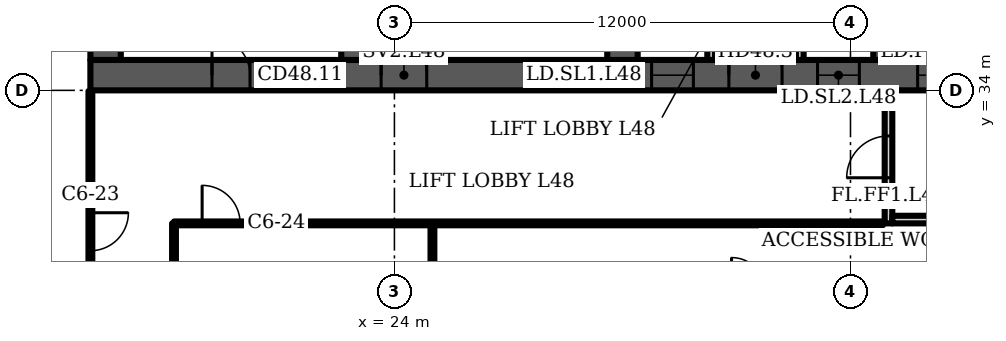
"""IFC4 building model, lengths in metres.
Left out: names, types, materials, properties, quantities, classifications, styles, units other than length and angle.
Written with IfcOpenShell. Run it as: python <this file> out.ifc"""

import sys

from ifc_helpers import new_model, si_unit, direction, frame, frame_2d, origin, place, context, subcontext, project, spatial, polyline, rectangle, outline, extrude, element, fill, save


model = new_model("IFC4")
c1 = context("Model", 3, precision=1e-05, world=origin(), true_north=direction((0.0, 1.0)))
c2 = subcontext(c1, "Body", "Model", "MODEL_VIEW")
j1 = project(units=[si_unit("LENGTHUNIT", "METRE"), si_unit("PLANEANGLEUNIT", "RADIAN")], contexts=[c1])
p1 = place(None, origin())
s1 = spatial("IfcSite", under=j1, at=p1, CompositionType="ELEMENT")
p2 = place(p1, origin())
s2 = spatial("IfcBuilding", under=s1, at=p2, CompositionType="ELEMENT")
p3 = place(p2, frame((0.0, 0.0, 195.1)))
s3 = spatial("IfcBuildingStorey", under=s2, at=p3, CompositionType="ELEMENT", Elevation=195.1)
p4 = place(p3, frame((16.0, 34.4, 0.0), z_axis=(0.0, 0.0, 1.0), x_axis=(1.0, 0.0, 0.0)))
e1 = element("IfcWall", 1, at=p4, inside=s3, PredefinedType="SHEAR", context=c2, shape_type="SweptSolid", body=[
    extrude(rectangle(XDim=42.0, YDim=0.8, at=frame_2d((21.0, 0.0))), origin(), (0.0, 0.0, 1.0), 3.6),
])
p5 = place(p4, frame((3.2, 0.0, 0.0)))
e2 = element("IfcOpeningElement", 2, at=p5, cuts=e1, PredefinedType="OPENING", context=c2, shape_type="SweptSolid", body=[
    extrude(rectangle(XDim=1.0, YDim=2.1, at=frame_2d((0.5, 1.05))), frame((0.0, 0.41, 0.0), z_axis=(0.0, -1.0, 0.0), x_axis=(1.0, 0.0, 0.0)), (0.0, 0.0, 1.0), 0.82),
])
p6 = place(p4, frame((7.65, 0.0, 0.0)))
e3 = element("IfcOpeningElement", 3, at=p6, cuts=e1, PredefinedType="OPENING", context=c2, shape_type="SweptSolid", body=[
    extrude(rectangle(XDim=1.2, YDim=2.1, at=frame_2d((0.6, 1.05))), frame((0.0, 0.41, 0.0), z_axis=(0.0, -1.0, 0.0), x_axis=(1.0, 0.0, 0.0)), (0.0, 0.0, 1.0), 0.82),
])
p7 = place(p4, frame((14.767, 0.0, 0.0)))
e4 = element("IfcOpeningElement", 4, at=p7, cuts=e1, PredefinedType="OPENING", context=c2, shape_type="SweptSolid", body=[
    extrude(rectangle(XDim=1.1, YDim=2.1, at=frame_2d((0.55, 1.05))), frame((0.0, 0.41, 0.0), z_axis=(0.0, -1.0, 0.0), x_axis=(1.0, 0.0, 0.0)), (0.0, 0.0, 1.0), 0.82),
])
p8 = place(p4, frame((19.133, 0.0, 0.0)))
e5 = element("IfcOpeningElement", 5, at=p8, cuts=e1, PredefinedType="OPENING", context=c2, shape_type="SweptSolid", body=[
    extrude(rectangle(XDim=1.1, YDim=2.1, at=frame_2d((0.55, 1.05))), frame((0.0, 0.41, 0.0), z_axis=(0.0, -1.0, 0.0), x_axis=(1.0, 0.0, 0.0)), (0.0, 0.0, 1.0), 0.82),
])
p9 = place(p4, frame((16.8, 0.0, 0.0)))
e6 = element("IfcOpeningElement", 6, at=p9, cuts=e1, PredefinedType="OPENING", context=c2, shape_type="SweptSolid", body=[
    extrude(rectangle(XDim=1.4, YDim=2.1, at=frame_2d((0.7, 1.05))), frame((0.0, 0.41, 0.0), z_axis=(0.0, -1.0, 0.0), x_axis=(1.0, 0.0, 0.0)), (0.0, 0.0, 1.0), 0.82),
])
p10 = place(p4, frame((21.767, 0.0, 0.0)))
e7 = element("IfcOpeningElement", 7, at=p10, cuts=e1, PredefinedType="OPENING", context=c2, shape_type="SweptSolid", body=[
    extrude(rectangle(XDim=1.1, YDim=2.1, at=frame_2d((0.55, 1.05))), frame((0.0, 0.41, 0.0), z_axis=(0.0, -1.0, 0.0), x_axis=(1.0, 0.0, 0.0)), (0.0, 0.0, 1.0), 0.82),
])
p11 = place(p4, frame((23.95, 0.0, 0.0)))
e8 = element("IfcOpeningElement", 8, at=p11, cuts=e1, PredefinedType="OPENING", context=c2, shape_type="SweptSolid", body=[
    extrude(rectangle(XDim=1.1, YDim=2.1, at=frame_2d((0.55, 1.05))), frame((0.0, 0.41, 0.0), z_axis=(0.0, -1.0, 0.0), x_axis=(1.0, 0.0, 0.0)), (0.0, 0.0, 1.0), 0.82),
])
p12 = place(p4, frame((26.133, 0.0, 0.0)))
e9 = element("IfcOpeningElement", 9, at=p12, cuts=e1, PredefinedType="OPENING", context=c2, shape_type="SweptSolid", body=[
    extrude(rectangle(XDim=1.1, YDim=2.1, at=frame_2d((0.55, 1.05))), frame((0.0, 0.41, 0.0), z_axis=(0.0, -1.0, 0.0), x_axis=(1.0, 0.0, 0.0)), (0.0, 0.0, 1.0), 0.82),
])
p13 = place(p4, frame((33.15, 0.0, 0.0)))
e10 = element("IfcOpeningElement", 10, at=p13, cuts=e1, PredefinedType="OPENING", context=c2, shape_type="SweptSolid", body=[
    extrude(rectangle(XDim=1.2, YDim=2.1, at=frame_2d((0.6, 1.05))), frame((0.0, 0.41, 0.0), z_axis=(0.0, -1.0, 0.0), x_axis=(1.0, 0.0, 0.0)), (0.0, 0.0, 1.0), 0.82),
])
p14 = place(p4, frame((35.817, 0.0, 0.0)))
e11 = element("IfcOpeningElement", 11, at=p14, cuts=e1, PredefinedType="OPENING", context=c2, shape_type="SweptSolid", body=[
    extrude(rectangle(XDim=1.0, YDim=2.1, at=frame_2d((0.5, 1.05))), frame((0.0, 0.41, 0.0), z_axis=(0.0, -1.0, 0.0), x_axis=(1.0, 0.0, 0.0)), (0.0, 0.0, 1.0), 0.82),
])
p15 = place(p4, frame((39.95, 0.0, 0.0)))
e12 = element("IfcOpeningElement", 12, at=p15, cuts=e1, PredefinedType="OPENING", context=c2, shape_type="SweptSolid", body=[
    extrude(rectangle(XDim=1.0, YDim=2.1, at=frame_2d((0.5, 1.05))), frame((0.0, 0.41, 0.0), z_axis=(0.0, -1.0, 0.0), x_axis=(1.0, 0.0, 0.0)), (0.0, 0.0, 1.0), 0.82),
])
p16 = place(p4, frame((37.767, 0.0, 0.0)))
e13 = element("IfcOpeningElement", 13, at=p16, cuts=e1, PredefinedType="OPENING", context=c2, shape_type="SweptSolid", body=[
    extrude(rectangle(XDim=1.4, YDim=2.1, at=frame_2d((0.7, 1.05))), frame((0.0, 0.41, 0.0), z_axis=(0.0, -1.0, 0.0), x_axis=(1.0, 0.0, 0.0)), (0.0, 0.0, 1.0), 0.82),
])
p17 = place(p3, frame((16.4, 34.8, 0.0), z_axis=(0.0, 0.0, 1.0), x_axis=(0.0, 1.0, 0.0)))
e14 = element("IfcWall", 14, at=p17, inside=s3, PredefinedType="SHEAR", context=c2, shape_type="SweptSolid", body=[
    extrude(rectangle(XDim=13.184, YDim=0.8, at=frame_2d((6.592, 0.0))), origin(), (0.0, 0.0, 1.0), 3.6),
])
p18 = place(p3, frame((23.0, 34.8, 0.0), z_axis=(0.0, 0.0, 1.0), x_axis=(0.0, 1.0, 0.0)))
e15 = element("IfcWall", 15, at=p18, inside=s3, PredefinedType="SHEAR", context=c2, shape_type="SweptSolid", body=[
    extrude(rectangle(XDim=13.762, YDim=0.8, at=frame_2d((6.881, 0.0))), origin(), (0.0, 0.0, 1.0), 3.6),
])
p19 = place(p18, frame((2.55, 0.0, 0.0)))
e16 = element("IfcOpeningElement", 16, at=p19, cuts=e15, PredefinedType="OPENING", context=c2, shape_type="SweptSolid", body=[
    extrude(rectangle(XDim=1.1, YDim=2.1, at=frame_2d((0.55, 1.05))), frame((0.0, 0.41, 0.0), z_axis=(0.0, -1.0, 0.0), x_axis=(1.0, 0.0, 0.0)), (0.0, 0.0, 1.0), 0.82),
])
p20 = place(p18, frame((10.0, 0.0, 0.0)))
e17 = element("IfcOpeningElement", 17, at=p20, cuts=e15, PredefinedType="OPENING", context=c2, shape_type="SweptSolid", body=[
    extrude(rectangle(XDim=1.0, YDim=2.1, at=frame_2d((0.5, 1.05))), frame((0.0, 0.41, 0.0), z_axis=(0.0, -1.0, 0.0), x_axis=(1.0, 0.0, 0.0)), (0.0, 0.0, 1.0), 0.82),
])
p21 = place(p3, frame((30.0, 34.8, 0.0), z_axis=(0.0, 0.0, 1.0), x_axis=(0.0, 1.0, 0.0)))
e18 = element("IfcWall", 18, at=p21, inside=s3, PredefinedType="SHEAR", context=c2, shape_type="SweptSolid", body=[
    extrude(rectangle(XDim=14.374, YDim=0.8, at=frame_2d((7.187, 0.0))), origin(), (0.0, 0.0, 1.0), 3.6),
])
p22 = place(p21, frame((3.6, 0.0, 0.0)))
e19 = element("IfcOpeningElement", 19, at=p22, cuts=e18, PredefinedType="OPENING", context=c2, shape_type="SweptSolid", body=[
    extrude(rectangle(XDim=1.1, YDim=2.1, at=frame_2d((0.55, 1.05))), frame((0.0, 0.41, 0.0), z_axis=(0.0, -1.0, 0.0), x_axis=(1.0, 0.0, 0.0)), (0.0, 0.0, 1.0), 0.82),
])
p23 = place(p3, frame((37.0, 34.8, 0.0), z_axis=(0.0, 0.0, 1.0), x_axis=(0.0, 1.0, 0.0)))
e20 = element("IfcWall", 20, at=p23, inside=s3, PredefinedType="SHEAR", context=c2, shape_type="SweptSolid", body=[
    extrude(rectangle(XDim=14.987, YDim=0.8, at=frame_2d((7.493, 0.0))), origin(), (0.0, 0.0, 1.0), 3.6),
])
p24 = place(p23, frame((11.312, 0.0, 0.0)))
e21 = element("IfcOpeningElement", 21, at=p24, cuts=e20, PredefinedType="OPENING", context=c2, shape_type="SweptSolid", body=[
    extrude(rectangle(XDim=1.0, YDim=2.1, at=frame_2d((0.5, 1.05))), frame((0.0, 0.41, 0.0), z_axis=(0.0, -1.0, 0.0), x_axis=(1.0, 0.0, 0.0)), (0.0, 0.0, 1.0), 0.82),
])
p25 = place(p23, frame((3.6, 0.0, 0.0)))
e22 = element("IfcOpeningElement", 22, at=p25, cuts=e20, PredefinedType="OPENING", context=c2, shape_type="SweptSolid", body=[
    extrude(rectangle(XDim=1.1, YDim=2.1, at=frame_2d((0.55, 1.05))), frame((0.0, 0.41, 0.0), z_axis=(0.0, -1.0, 0.0), x_axis=(1.0, 0.0, 0.0)), (0.0, 0.0, 1.0), 0.82),
])
p26 = place(p3, frame((0.0, 0.0, -0.0)))
e23 = element("IfcWall", 23, at=p26, inside=s3, PredefinedType="PARTITIONING", context=c2, shape_type="SweptSolid", body=[
    extrude(outline(polyline([(32.233, 37.65), (30.4, 37.65), (30.4, 37.85), (32.233, 37.85), (32.433, 37.85), (32.433, 34.8), (32.233, 34.8), (32.233, 37.65)])), origin(), (0.0, 0.0, 1.0), 3.2),
])
p27 = place(p3, frame((0.0, 0.0, -0.0)))
e24 = element("IfcWall", 24, at=p27, inside=s3, PredefinedType="PARTITIONING", context=c2, shape_type="SweptSolid", body=[
    extrude(outline(polyline([(34.567, 37.85), (34.767, 37.85), (36.6, 37.85), (36.6, 37.65), (34.767, 37.65), (34.767, 34.8), (34.567, 34.8), (34.567, 37.85)])), origin(), (0.0, 0.0, 1.0), 3.2),
])
p28 = place(p3, frame((0.0, 0.0, -0.0)))
e25 = element("IfcWall", 25, at=p28, inside=s3, PredefinedType="PARTITIONING", context=c2, shape_type="SweptSolid", body=[
    extrude(outline(polyline([(41.567, 37.1), (39.433, 37.1), (39.433, 34.8), (39.233, 34.8), (39.233, 37.65), (37.4, 37.65), (37.4, 37.85), (39.233, 37.85), (39.433, 37.85), (39.433, 37.3), (41.567, 37.3), (41.567, 37.55), (41.767, 37.55), (43.6, 37.55), (43.6, 37.35), (41.767, 37.35), (41.767, 34.8), (41.567, 34.8), (41.567, 37.1)])), origin(), (0.0, 0.0, 1.0), 3.2),
])
p29 = place(p3, frame((37.0, 30.5, 0.0), z_axis=(0.0, 0.0, 1.0), x_axis=(0.0, 1.0, 0.0)))
e26 = element("IfcWall", 26, at=p29, inside=s3, PredefinedType="PARTITIONING", context=c2, shape_type="SweptSolid", body=[
    extrude(rectangle(XDim=3.5, YDim=0.2, at=frame_2d((1.75, 0.0))), origin(), (0.0, 0.0, 1.0), 3.2),
])
p30 = place(p29, frame((1.2, 0.0, 0.0)))
e27 = element("IfcOpeningElement", 27, at=p30, cuts=e26, PredefinedType="OPENING", context=c2, shape_type="SweptSolid", body=[
    extrude(rectangle(XDim=1.1, YDim=2.1, at=frame_2d((0.55, 1.05))), frame((0.0, 0.11, 0.0), z_axis=(0.0, -1.0, 0.0), x_axis=(1.0, 0.0, 0.0)), (0.0, 0.0, 1.0), 0.22),
])
p31 = place(p3, frame((37.1, 30.6, 0.0), z_axis=(0.0, 0.0, 1.0), x_axis=(1.0, 0.0, 0.0)))
e28 = element("IfcWall", 28, at=p31, inside=s3, PredefinedType="PARTITIONING", context=c2, shape_type="SweptSolid", body=[
    extrude(rectangle(XDim=2.8, YDim=0.2, at=frame_2d((1.4, 0.0))), origin(), (0.0, 0.0, 1.0), 3.2),
])
p32 = place(p3, frame((16.0, 26.45, 0.0), z_axis=(0.0, 0.0, 1.0), x_axis=(0.0, 1.0, 0.0)))
e29 = element("IfcWall", 29, at=p32, inside=s3, PredefinedType="PARTITIONING", context=c2, shape_type="SweptSolid", body=[
    extrude(rectangle(XDim=7.53, YDim=0.1, at=frame_2d((3.765, 0.0))), origin(), (0.0, 0.0, 1.0), 3.2),
])
p33 = place(p32, frame((3.33, 0.0, 0.0)))
e30 = element("IfcOpeningElement", 30, at=p33, cuts=e29, PredefinedType="OPENING", context=c2, shape_type="SweptSolid", body=[
    extrude(rectangle(XDim=1.0, YDim=2.1, at=frame_2d((0.5, 1.05))), frame((0.0, 0.06, 0.0), z_axis=(0.0, -1.0, 0.0), x_axis=(1.0, 0.0, 0.0)), (0.0, 0.0, 1.0), 0.12),
])
p34 = place(p3, frame((18.2, 26.06, 0.0), z_axis=(0.0, 0.0, 1.0), x_axis=(0.0, 1.0, 0.0)))
e31 = element("IfcWall", 31, at=p34, inside=s3, PredefinedType="PARTITIONING", context=c2, shape_type="SweptSolid", body=[
    extrude(rectangle(XDim=4.44, YDim=0.1, at=frame_2d((2.22, 0.0))), origin(), (0.0, 0.0, 1.0), 3.2),
])
p35 = place(p3, frame((18.2, 30.5, 0.0), z_axis=(0.0, 0.0, 1.0), x_axis=(1.0, 0.0, 0.0)))
e32 = element("IfcWall", 32, at=p35, inside=s3, PredefinedType="PARTITIONING", context=c2, shape_type="SweptSolid", body=[
    extrude(rectangle(XDim=18.65, YDim=0.1, at=frame_2d((9.325, 0.0))), origin(), (0.0, 0.0, 1.0), 3.2),
])
p36 = place(p35, frame((0.74, 0.0, 0.0)))
e33 = element("IfcOpeningElement", 33, at=p36, cuts=e32, PredefinedType="OPENING", context=c2, shape_type="SweptSolid", body=[
    extrude(rectangle(XDim=1.0, YDim=2.1, at=frame_2d((0.5, 1.05))), frame((0.0, 0.06, 0.0), z_axis=(0.0, -1.0, 0.0), x_axis=(1.0, 0.0, 0.0)), (0.0, 0.0, 1.0), 0.12),
])
p37 = place(p3, frame((25.0, 22.34, 0.0), z_axis=(0.0, 0.0, 1.0), x_axis=(0.0, 1.0, 0.0)))
e34 = element("IfcWall", 34, at=p37, inside=s3, PredefinedType="PARTITIONING", context=c2, shape_type="SweptSolid", body=[
    extrude(rectangle(XDim=8.16, YDim=0.1, at=frame_2d((4.08, 0.0))), origin(), (0.0, 0.0, 1.0), 3.2),
])
p38 = place(p5, origin())
e35 = element("IfcDoor", 35, at=p38, inside=s3, OperationType="SINGLE_SWING_LEFT", PredefinedType="DOOR", context=c2, shape_type="SweptSolid", body=[
    extrude(rectangle(XDim=1.0, YDim=2.1, at=frame_2d((0.5, 1.05))), frame((0.0, 0.4, 0.0), z_axis=(0.0, -1.0, 0.0), x_axis=(1.0, 0.0, 0.0)), (0.0, 0.0, 1.0), 0.8),
])
fill(e2, e35)
p39 = place(p6, origin())
e36 = element("IfcDoor", 36, at=p39, inside=s3, OperationType="SINGLE_SWING_LEFT", PredefinedType="DOOR", context=c2, shape_type="SweptSolid", body=[
    extrude(rectangle(XDim=1.2, YDim=2.1, at=frame_2d((0.6, 1.05))), frame((0.0, 0.025, 0.0), z_axis=(0.0, -1.0, 0.0), x_axis=(1.0, 0.0, 0.0)), (0.0, 0.0, 1.0), 0.05),
])
fill(e3, e36)
p40 = place(p7, origin())
e37 = element("IfcDoor", 37, at=p40, inside=s3, OperationType="DOUBLE_DOOR_SLIDING", PredefinedType="DOOR", context=c2, shape_type="SweptSolid", body=[
    extrude(rectangle(XDim=1.1, YDim=2.1, at=frame_2d((0.55, 1.05))), frame((0.0, 0.025, 0.0), z_axis=(0.0, -1.0, 0.0), x_axis=(1.0, 0.0, 0.0)), (0.0, 0.0, 1.0), 0.05),
])
fill(e4, e37)
p41 = place(p8, origin())
e38 = element("IfcDoor", 38, at=p41, inside=s3, OperationType="DOUBLE_DOOR_SLIDING", PredefinedType="DOOR", context=c2, shape_type="SweptSolid", body=[
    extrude(rectangle(XDim=1.1, YDim=2.1, at=frame_2d((0.55, 1.05))), frame((0.0, 0.025, 0.0), z_axis=(0.0, -1.0, 0.0), x_axis=(1.0, 0.0, 0.0)), (0.0, 0.0, 1.0), 0.05),
])
fill(e5, e38)
p42 = place(p9, origin())
e39 = element("IfcDoor", 39, at=p42, inside=s3, OperationType="DOUBLE_DOOR_SINGLE_SWING", PredefinedType="DOOR", context=c2, shape_type="SweptSolid", body=[
    extrude(rectangle(XDim=1.4, YDim=2.1, at=frame_2d((0.7, 1.05))), frame((0.0, 0.025, 0.0), z_axis=(0.0, -1.0, 0.0), x_axis=(1.0, 0.0, 0.0)), (0.0, 0.0, 1.0), 0.05),
])
fill(e6, e39)
p43 = place(p10, origin())
e40 = element("IfcDoor", 40, at=p43, inside=s3, OperationType="DOUBLE_DOOR_SLIDING", PredefinedType="DOOR", context=c2, shape_type="SweptSolid", body=[
    extrude(rectangle(XDim=1.1, YDim=2.1, at=frame_2d((0.55, 1.05))), frame((0.0, 0.025, 0.0), z_axis=(0.0, -1.0, 0.0), x_axis=(1.0, 0.0, 0.0)), (0.0, 0.0, 1.0), 0.05),
])
fill(e7, e40)
p44 = place(p30, origin())
e41 = element("IfcDoor", 41, at=p44, inside=s3, OperationType="SINGLE_SWING_LEFT", PredefinedType="DOOR", context=c2, shape_type="SweptSolid", body=[
    extrude(rectangle(XDim=1.1, YDim=2.1, at=frame_2d((0.55, 1.05))), frame((0.0, 0.025, 0.0), z_axis=(0.0, -1.0, 0.0), x_axis=(1.0, 0.0, 0.0)), (0.0, 0.0, 1.0), 0.05),
])
fill(e27, e41)
p45 = place(p33, origin())
e42 = element("IfcDoor", 42, at=p45, inside=s3, OperationType="SINGLE_SWING_RIGHT", PredefinedType="DOOR", context=c2, shape_type="SweptSolid", body=[
    extrude(rectangle(XDim=1.0, YDim=2.1, at=frame_2d((0.5, 1.05))), frame((0.0, 0.025, 0.0), z_axis=(0.0, -1.0, 0.0), x_axis=(1.0, 0.0, 0.0)), (0.0, 0.0, 1.0), 0.05),
])
fill(e30, e42)
p46 = place(p36, origin())
e43 = element("IfcDoor", 43, at=p46, inside=s3, OperationType="SINGLE_SWING_LEFT", PredefinedType="DOOR", context=c2, shape_type="SweptSolid", body=[
    extrude(rectangle(XDim=1.0, YDim=2.1, at=frame_2d((0.5, 1.05))), frame((0.0, 0.025, 0.0), z_axis=(0.0, -1.0, 0.0), x_axis=(1.0, 0.0, 0.0)), (0.0, 0.0, 1.0), 0.05),
])
fill(e33, e43)
save(model, sys.argv[1])
